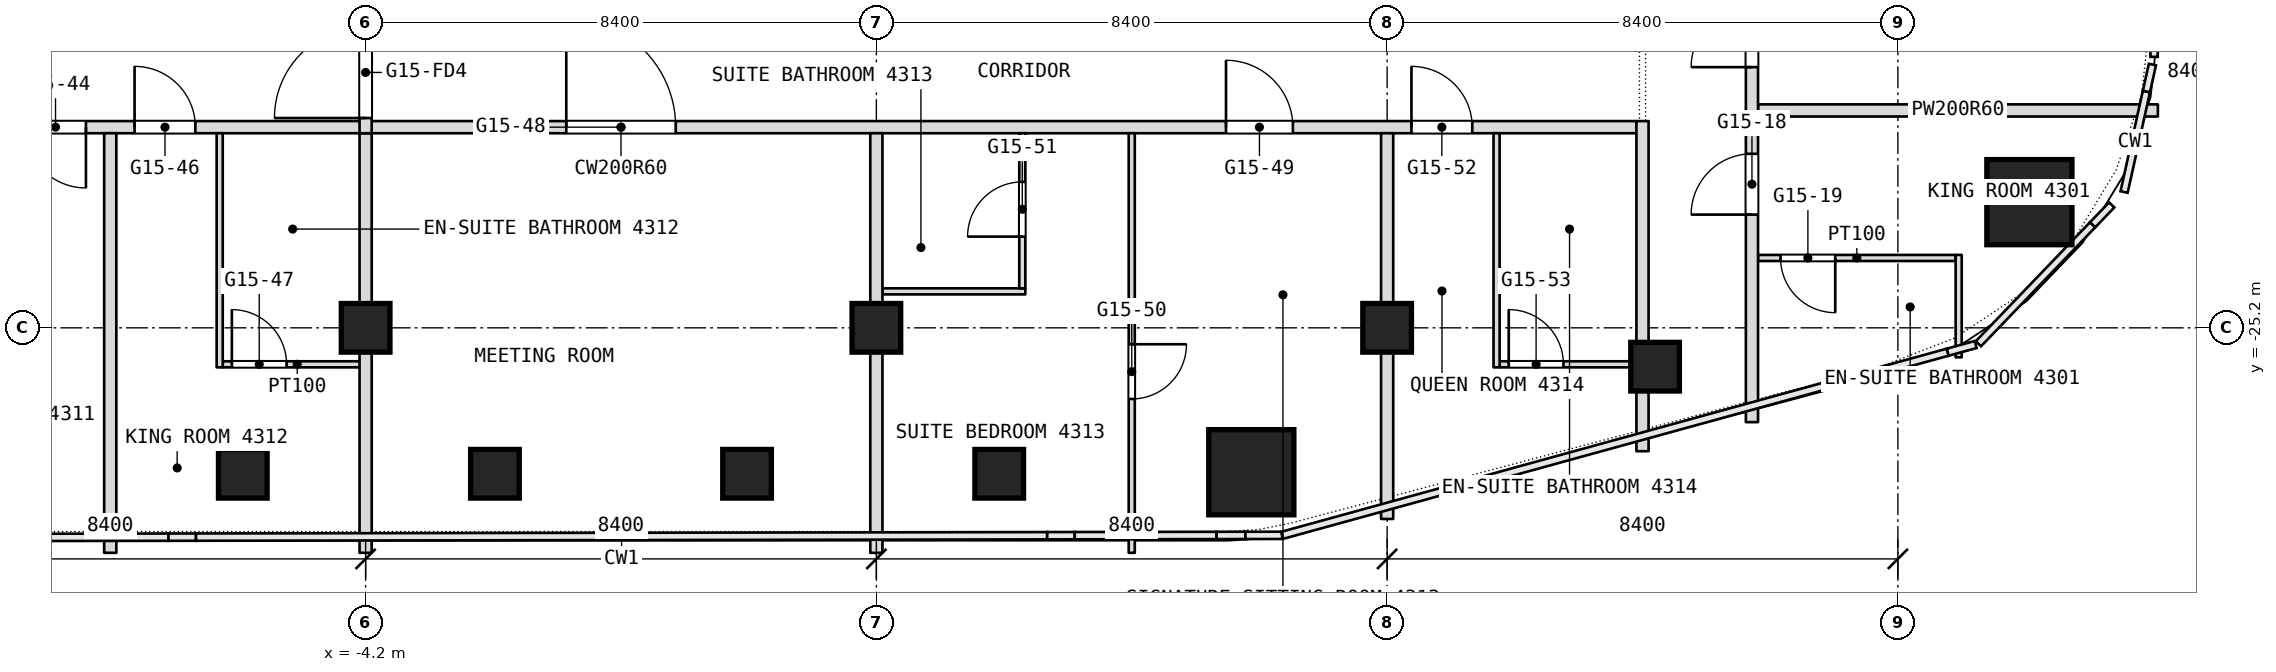
"""IFC4 building model, lengths in metres.
Left out: names, types, materials, properties, quantities, classifications, styles, units other than length and angle.
Written with IfcOpenShell. Run it as: python <this file> out.ifc"""

import sys

from ifc_helpers import new_model, si_unit, direction, frame, frame_2d, origin, origin_2d, place, context, subcontext, project, spatial, rectangle, extrude, element, fill, save


model = new_model("IFC4")
c1 = context("Model", 3, precision=1e-05, world=origin(), true_north=direction((0.0, 1.0)))
c2 = subcontext(c1, "Body", "Model", "MODEL_VIEW")
j1 = project(units=[si_unit("LENGTHUNIT", "METRE"), si_unit("PLANEANGLEUNIT", "RADIAN")], contexts=[c1])
p1 = place(None, origin())
s1 = spatial("IfcSite", under=j1, at=p1, CompositionType="ELEMENT")
p2 = place(p1, origin())
s2 = spatial("IfcBuilding", under=s1, at=p2, CompositionType="ELEMENT")
p3 = place(p2, frame((0.0, 0.0, 191.3)))
s3 = spatial("IfcBuildingStorey", under=s2, at=p3, CompositionType="ELEMENT", Elevation=191.3)
for number, where, z_axis, x_axis in (
    (1, (10.366, -27.575, 0.0), (0.0, 0.0, 1.0), (1.0, 0.0, 0.0)),
    (2, (23.163, -23.133, 0.0), (0.0, 0.0, 1.0), (1.0, 0.0, 0.0)),
):
    element("IfcColumn", number, at=place(p3, frame(where, z_axis=z_axis, x_axis=x_axis)), inside=s3, PredefinedType="COLUMN", context=c2, shape_type="SweptSolid", body=[
        extrude(rectangle(XDim=1.4, YDim=1.4, at=origin_2d()), origin(), (0.0, 0.0, 1.0), 3.6),
    ])
for number, where, z_axis, x_axis in (
    (3, (-4.2, -25.2, 0.0), (0.0, 0.0, 1.0), (1.0, 0.0, 0.0)),
    (4, (4.2, -25.2, 0.0), (0.0, 0.0, 1.0), (1.0, 0.0, 0.0)),
    (5, (12.6, -25.2, 0.0), (0.0, 0.0, 1.0), (1.0, 0.0, 0.0)),
    (6, (17.007, -25.839, 0.0), (0.0, 0.0, 1.0), (1.0, 0.0, 0.0)),
    (7, (6.22, -27.6, 0.0), (0.0, 0.0, 1.0), (1.0, 0.0, 0.0)),
    (8, (2.073, -27.6, 0.0), (0.0, 0.0, 1.0), (1.0, 0.0, 0.0)),
    (9, (-2.073, -27.6, 0.0), (0.0, 0.0, 1.0), (1.0, 0.0, 0.0)),
    (10, (-6.22, -27.6, 0.0), (0.0, 0.0, 1.0), (1.0, 0.0, 0.0)),
):
    element("IfcColumn", number, at=place(p3, frame(where, z_axis=z_axis, x_axis=x_axis)), inside=s3, PredefinedType="COLUMN", context=c2, shape_type="SweptSolid", body=[
        extrude(rectangle(XDim=0.8, YDim=0.8, at=origin_2d()), origin(), (0.0, 0.0, 1.0), 3.6),
    ])
p4 = place(p3, frame((-6.55, -25.8, 0.0), z_axis=(0.0, 0.0, 1.0), x_axis=(1.0, 0.0, 0.0)))
e11 = element("IfcWall", 11, at=p4, inside=s3, PredefinedType="PARTITIONING", context=c2, shape_type="SweptSolid", body=[
    extrude(rectangle(XDim=2.45, YDim=0.1, at=frame_2d((1.225, 0.0))), origin(), (0.0, 0.0, 1.0), 3.34),
])
p5 = place(p4, frame((0.15, 0.0, 0.0)))
e12 = element("IfcOpeningElement", 12, at=p5, cuts=e11, PredefinedType="OPENING", context=c2, shape_type="SweptSolid", body=[
    extrude(rectangle(XDim=0.9, YDim=2.1, at=frame_2d((0.45, 1.05))), frame((0.0, 0.05, 0.0), z_axis=(0.0, -1.0, 0.0), x_axis=(1.0, 0.0, 0.0)), (0.0, 0.0, 1.0), 0.1),
])
p6 = place(p3, frame((14.45, -25.8, 0.0), z_axis=(0.0, 0.0, 1.0), x_axis=(1.0, 0.0, 0.0)))
e13 = element("IfcWall", 13, at=p6, inside=s3, PredefinedType="PARTITIONING", context=c2, shape_type="SweptSolid", body=[
    extrude(rectangle(XDim=2.25, YDim=0.1, at=frame_2d((1.125, 0.0))), origin(), (0.0, 0.0, 1.0), 3.34),
])
p7 = place(p6, frame((0.15, 0.0, 0.0)))
e14 = element("IfcOpeningElement", 14, at=p7, cuts=e13, PredefinedType="OPENING", context=c2, shape_type="SweptSolid", body=[
    extrude(rectangle(XDim=0.9, YDim=2.1, at=frame_2d((0.45, 1.05))), frame((0.0, 0.05, 0.0), z_axis=(0.0, -1.0, 0.0), x_axis=(1.0, 0.0, 0.0)), (0.0, 0.0, 1.0), 0.1),
])
p8 = place(p3, frame((4.3, -24.6, 0.0), z_axis=(0.0, 0.0, 1.0), x_axis=(1.0, 0.0, 0.0)))
e15 = element("IfcWall", 15, at=p8, inside=s3, PredefinedType="PARTITIONING", context=c2, shape_type="SweptSolid", body=[
    extrude(rectangle(XDim=2.35, YDim=0.1, at=frame_2d((1.175, 0.0))), origin(), (0.0, 0.0, 1.0), 3.34),
])
p9 = place(p3, frame((18.7, -24.051, 0.0), z_axis=(0.0, 0.0, 1.0), x_axis=(1.0, 0.0, 0.0)))
e16 = element("IfcWall", 16, at=p9, inside=s3, PredefinedType="PARTITIONING", context=c2, shape_type="SweptSolid", body=[
    extrude(rectangle(XDim=3.25, YDim=0.1, at=frame_2d((1.625, 0.0))), origin(), (0.0, 0.0, 1.0), 3.34),
])
p10 = place(p9, frame((0.37, 0.0, 0.0)))
e17 = element("IfcOpeningElement", 17, at=p10, cuts=e16, PredefinedType="OPENING", context=c2, shape_type="SweptSolid", body=[
    extrude(rectangle(XDim=0.9, YDim=2.1, at=frame_2d((0.45, 1.05))), frame((0.0, 0.05, 0.0), z_axis=(0.0, -1.0, 0.0), x_axis=(1.0, 0.0, 0.0)), (0.0, 0.0, 1.0), 0.1),
])
p11 = place(p3, frame((22.0, -25.685, 0.0), z_axis=(0.0, 0.0, 1.0), x_axis=(0.0, 1.0, 0.0)))
e18 = element("IfcWall", 18, at=p11, inside=s3, PredefinedType="PARTITIONING", context=c2, shape_type="SweptSolid", body=[
    extrude(rectangle(XDim=1.684, YDim=0.1, at=frame_2d((0.842, 0.0))), origin(), (0.0, 0.0, 1.0), 3.34),
])
p12 = place(p3, frame((-16.7, -21.9, 0.0), z_axis=(0.0, 0.0, 1.0), x_axis=(1.0, 0.0, 0.0)))
e19 = element("IfcWall", 19, at=p12, inside=s3, PredefinedType="PARTITIONING", context=c2, shape_type="SweptSolid", body=[
    extrude(rectangle(XDim=33.4, YDim=0.2, at=frame_2d((16.7, 0.0))), origin(), (0.0, 0.0, 1.0), 3.34),
])
p13 = place(p12, frame((0.3, 0.0, 0.0)))
e20 = element("IfcOpeningElement", 20, at=p13, cuts=e19, PredefinedType="OPENING", context=c2, shape_type="SweptSolid", body=[
    extrude(rectangle(XDim=1.0, YDim=2.1, at=frame_2d((0.5, 1.05))), frame((0.0, 0.1, 0.0), z_axis=(0.0, -1.0, 0.0), x_axis=(1.0, 0.0, 0.0)), (0.0, 0.0, 1.0), 0.2),
])
p14 = place(p12, frame((6.9, 0.0, 0.0)))
e21 = element("IfcOpeningElement", 21, at=p14, cuts=e19, PredefinedType="OPENING", context=c2, shape_type="SweptSolid", body=[
    extrude(rectangle(XDim=1.0, YDim=2.1, at=frame_2d((0.5, 1.05))), frame((0.0, 0.1, 0.0), z_axis=(0.0, -1.0, 0.0), x_axis=(1.0, 0.0, 0.0)), (0.0, 0.0, 1.0), 0.2),
])
p15 = place(p12, frame((8.7, 0.0, 0.0)))
e22 = element("IfcOpeningElement", 22, at=p15, cuts=e19, PredefinedType="OPENING", context=c2, shape_type="SweptSolid", body=[
    extrude(rectangle(XDim=1.0, YDim=2.1, at=frame_2d((0.5, 1.05))), frame((0.0, 0.1, 0.0), z_axis=(0.0, -1.0, 0.0), x_axis=(1.0, 0.0, 0.0)), (0.0, 0.0, 1.0), 0.2),
])
p16 = place(p12, frame((15.8, 0.0, 0.0)))
e23 = element("IfcOpeningElement", 23, at=p16, cuts=e19, PredefinedType="OPENING", context=c2, shape_type="SweptSolid", body=[
    extrude(rectangle(XDim=1.8, YDim=2.1, at=frame_2d((0.9, 1.05))), frame((0.0, 0.1, 0.0), z_axis=(0.0, -1.0, 0.0), x_axis=(1.0, 0.0, 0.0)), (0.0, 0.0, 1.0), 0.2),
])
p17 = place(p12, frame((26.65, 0.0, 0.0)))
e24 = element("IfcOpeningElement", 24, at=p17, cuts=e19, PredefinedType="OPENING", context=c2, shape_type="SweptSolid", body=[
    extrude(rectangle(XDim=1.1, YDim=2.1, at=frame_2d((0.55, 1.05))), frame((0.0, 0.1, 0.0), z_axis=(0.0, -1.0, 0.0), x_axis=(1.0, 0.0, 0.0)), (0.0, 0.0, 1.0), 0.2),
])
p18 = place(p12, frame((29.7, 0.0, 0.0)))
e25 = element("IfcOpeningElement", 25, at=p18, cuts=e19, PredefinedType="OPENING", context=c2, shape_type="SweptSolid", body=[
    extrude(rectangle(XDim=1.0, YDim=2.1, at=frame_2d((0.5, 1.05))), frame((0.0, 0.1, 0.0), z_axis=(0.0, -1.0, 0.0), x_axis=(1.0, 0.0, 0.0)), (0.0, 0.0, 1.0), 0.2),
])
p19 = place(p3, frame((18.7, -21.625, 0.0), z_axis=(0.0, 0.0, 1.0), x_axis=(1.0, 0.0, 0.0)))
e26 = element("IfcWall", 26, at=p19, inside=s3, PredefinedType="PARTITIONING", context=c2, shape_type="SweptSolid", body=[
    extrude(rectangle(XDim=6.576, YDim=0.2, at=frame_2d((3.288, 0.0))), origin(), (0.0, 0.0, 1.0), 3.34),
])
p20 = place(p3, frame((18.6, -26.751, 0.0), z_axis=(0.0, 0.0, 1.0), x_axis=(0.0, 1.0, 0.0)))
e27 = element("IfcWall", 27, at=p20, inside=s3, PredefinedType="PARTITIONING", context=c2, shape_type="SweptSolid", body=[
    extrude(rectangle(XDim=49.091, YDim=0.2, at=frame_2d((24.545, 0.0))), origin(), (0.0, 0.0, 1.0), 3.34),
])
p21 = place(p20, frame((3.413, 0.0, 0.0)))
e28 = element("IfcOpeningElement", 28, at=p21, cuts=e27, PredefinedType="OPENING", context=c2, shape_type="SweptSolid", body=[
    extrude(rectangle(XDim=1.0, YDim=2.1, at=frame_2d((0.5, 1.05))), frame((0.0, 0.1, 0.0), z_axis=(0.0, -1.0, 0.0), x_axis=(1.0, 0.0, 0.0)), (0.0, 0.0, 1.0), 0.2),
])
p22 = place(p20, frame((5.838, 0.0, 0.0)))
e29 = element("IfcOpeningElement", 29, at=p22, cuts=e27, PredefinedType="OPENING", context=c2, shape_type="SweptSolid", body=[
    extrude(rectangle(XDim=1.0, YDim=2.1, at=frame_2d((0.5, 1.05))), frame((0.0, 0.1, 0.0), z_axis=(0.0, -1.0, 0.0), x_axis=(1.0, 0.0, 0.0)), (0.0, 0.0, 1.0), 0.2),
])
p23 = place(p20, frame((10.351, 0.0, 0.0)))
e30 = element("IfcOpeningElement", 30, at=p23, cuts=e27, PredefinedType="OPENING", context=c2, shape_type="SweptSolid", body=[
    extrude(rectangle(XDim=1.0, YDim=2.1, at=frame_2d((0.5, 1.05))), frame((0.0, 0.1, 0.0), z_axis=(0.0, -1.0, 0.0), x_axis=(1.0, 0.0, 0.0)), (0.0, 0.0, 1.0), 0.2),
])
p24 = place(p20, frame((16.951, 0.0, 0.0)))
e31 = element("IfcOpeningElement", 31, at=p24, cuts=e27, PredefinedType="OPENING", context=c2, shape_type="SweptSolid", body=[
    extrude(rectangle(XDim=1.0, YDim=2.1, at=frame_2d((0.5, 1.05))), frame((0.0, 0.1, 0.0), z_axis=(0.0, -1.0, 0.0), x_axis=(1.0, 0.0, 0.0)), (0.0, 0.0, 1.0), 0.2),
])
p25 = place(p20, frame((21.151, 0.0, 0.0)))
e32 = element("IfcOpeningElement", 32, at=p25, cuts=e27, PredefinedType="OPENING", context=c2, shape_type="SweptSolid", body=[
    extrude(rectangle(XDim=1.0, YDim=2.1, at=frame_2d((0.5, 1.05))), frame((0.0, 0.1, 0.0), z_axis=(0.0, -1.0, 0.0), x_axis=(1.0, 0.0, 0.0)), (0.0, 0.0, 1.0), 0.2),
])
p26 = place(p20, frame((22.951, 0.0, 0.0)))
e33 = element("IfcOpeningElement", 33, at=p26, cuts=e27, PredefinedType="OPENING", context=c2, shape_type="SweptSolid", body=[
    extrude(rectangle(XDim=1.0, YDim=2.1, at=frame_2d((0.5, 1.05))), frame((0.0, 0.1, 0.0), z_axis=(0.0, -1.0, 0.0), x_axis=(1.0, 0.0, 0.0)), (0.0, 0.0, 1.0), 0.2),
])
p27 = place(p20, frame((27.151, 0.0, 0.0)))
e34 = element("IfcOpeningElement", 34, at=p27, cuts=e27, PredefinedType="OPENING", context=c2, shape_type="SweptSolid", body=[
    extrude(rectangle(XDim=1.0, YDim=2.1, at=frame_2d((0.5, 1.05))), frame((0.0, 0.1, 0.0), z_axis=(0.0, -1.0, 0.0), x_axis=(1.0, 0.0, 0.0)), (0.0, 0.0, 1.0), 0.2),
])
p28 = place(p20, frame((33.751, 0.0, 0.0)))
e35 = element("IfcOpeningElement", 35, at=p28, cuts=e27, PredefinedType="OPENING", context=c2, shape_type="SweptSolid", body=[
    extrude(rectangle(XDim=1.0, YDim=2.1, at=frame_2d((0.5, 1.05))), frame((0.0, 0.1, 0.0), z_axis=(0.0, -1.0, 0.0), x_axis=(1.0, 0.0, 0.0)), (0.0, 0.0, 1.0), 0.2),
])
p29 = place(p20, frame((38.451, 0.0, 0.0)))
e36 = element("IfcOpeningElement", 36, at=p29, cuts=e27, PredefinedType="OPENING", context=c2, shape_type="SweptSolid", body=[
    extrude(rectangle(XDim=1.8, YDim=2.1, at=frame_2d((0.9, 1.05))), frame((0.0, 0.1, 0.0), z_axis=(0.0, -1.0, 0.0), x_axis=(1.0, 0.0, 0.0)), (0.0, 0.0, 1.0), 0.2),
])
p30 = place(p20, frame((44.051, 0.0, 0.0)))
e37 = element("IfcOpeningElement", 37, at=p30, cuts=e27, PredefinedType="OPENING", context=c2, shape_type="SweptSolid", body=[
    extrude(rectangle(XDim=1.0, YDim=2.1, at=frame_2d((0.5, 1.05))), frame((0.0, 0.1, 0.0), z_axis=(0.0, -1.0, 0.0), x_axis=(1.0, 0.0, 0.0)), (0.0, 0.0, 1.0), 0.2),
])
p31 = place(p3, frame((16.8, -27.229, 0.0), z_axis=(0.0, 0.0, 1.0), x_axis=(0.0, 1.0, 0.0)))
e38 = element("IfcWall", 38, at=p31, inside=s3, PredefinedType="PARTITIONING", context=c2, shape_type="SweptSolid", body=[
    extrude(rectangle(XDim=5.429, YDim=0.2, at=frame_2d((2.714, 0.0))), origin(), (0.0, 0.0, 1.0), 3.34),
])
p32 = place(p3, frame((14.4, -25.85, 0.0), z_axis=(0.0, 0.0, 1.0), x_axis=(0.0, 1.0, 0.0)))
e39 = element("IfcWall", 39, at=p32, inside=s3, PredefinedType="PARTITIONING", context=c2, shape_type="SweptSolid", body=[
    extrude(rectangle(XDim=3.85, YDim=0.1, at=frame_2d((1.925, 0.0))), origin(), (0.0, 0.0, 1.0), 3.34),
])
p33 = place(p3, frame((12.6, -28.343, 0.0), z_axis=(0.0, 0.0, 1.0), x_axis=(0.0, 1.0, 0.0)))
e40 = element("IfcWall", 40, at=p33, inside=s3, PredefinedType="PARTITIONING", context=c2, shape_type="SweptSolid", body=[
    extrude(rectangle(XDim=6.343, YDim=0.2, at=frame_2d((3.171, 0.0))), origin(), (0.0, 0.0, 1.0), 3.34),
])
p34 = place(p3, frame((8.4, -28.9, 0.0), z_axis=(0.0, 0.0, 1.0), x_axis=(0.0, 1.0, 0.0)))
e41 = element("IfcWall", 41, at=p34, inside=s3, PredefinedType="PARTITIONING", context=c2, shape_type="SweptSolid", body=[
    extrude(rectangle(XDim=6.9, YDim=0.1, at=frame_2d((3.45, 0.0))), origin(), (0.0, 0.0, 1.0), 3.34),
])
p35 = place(p34, frame((2.53, 0.0, 0.0)))
e42 = element("IfcOpeningElement", 42, at=p35, cuts=e41, PredefinedType="OPENING", context=c2, shape_type="SweptSolid", body=[
    extrude(rectangle(XDim=0.9, YDim=2.1, at=frame_2d((0.45, 1.05))), frame((0.0, 0.05, 0.0), z_axis=(0.0, -1.0, 0.0), x_axis=(1.0, 0.0, 0.0)), (0.0, 0.0, 1.0), 0.1),
])
p36 = place(p3, frame((6.6, -24.55, 0.0), z_axis=(0.0, 0.0, 1.0), x_axis=(0.0, 1.0, 0.0)))
e43 = element("IfcWall", 43, at=p36, inside=s3, PredefinedType="PARTITIONING", context=c2, shape_type="SweptSolid", body=[
    extrude(rectangle(XDim=2.55, YDim=0.1, at=frame_2d((1.275, 0.0))), origin(), (0.0, 0.0, 1.0), 3.34),
])
p37 = place(p36, frame((0.85, 0.0, 0.0)))
e44 = element("IfcOpeningElement", 44, at=p37, cuts=e43, PredefinedType="OPENING", context=c2, shape_type="SweptSolid", body=[
    extrude(rectangle(XDim=0.9, YDim=2.1, at=frame_2d((0.45, 1.05))), frame((0.0, 0.05, 0.0), z_axis=(0.0, -1.0, 0.0), x_axis=(1.0, 0.0, 0.0)), (0.0, 0.0, 1.0), 0.1),
])
for number, where, z_axis, x_axis in (
    (45, (4.2, -28.9, 0.0), (0.0, 0.0, 1.0), (0.0, 1.0, 0.0)),
    (46, (-4.2, -28.9, 0.0), (0.0, 0.0, 1.0), (0.0, 1.0, 0.0)),
):
    element("IfcWall", number, at=place(p3, frame(where, z_axis=z_axis, x_axis=x_axis)), inside=s3, PredefinedType="PARTITIONING", context=c2, shape_type="SweptSolid", body=[
        extrude(rectangle(XDim=6.9, YDim=0.2, at=frame_2d((3.45, 0.0))), origin(), (0.0, 0.0, 1.0), 3.34),
    ])
p38 = place(p3, frame((-4.2, -22.0, 0.0), z_axis=(0.0, 0.0, 1.0), x_axis=(0.0, 1.0, 0.0)))
e47 = element("IfcWall", 47, at=p38, inside=s3, PredefinedType="PARTITIONING", context=c2, shape_type="SweptSolid", body=[
    extrude(rectangle(XDim=8.4, YDim=0.2, at=frame_2d((4.2, 0.0))), origin(), (0.0, 0.0, 1.0), 3.34),
])
p39 = place(p38, frame((0.25, 0.0, 0.0)))
e48 = element("IfcOpeningElement", 48, at=p39, cuts=e47, PredefinedType="OPENING", context=c2, shape_type="SweptSolid", body=[
    extrude(rectangle(XDim=1.5, YDim=2.1, at=frame_2d((0.75, 1.05))), frame((0.0, 0.1, 0.0), z_axis=(0.0, -1.0, 0.0), x_axis=(1.0, 0.0, 0.0)), (0.0, 0.0, 1.0), 0.2),
])
p40 = place(p3, frame((-6.6, -25.85, 0.0), z_axis=(0.0, 0.0, 1.0), x_axis=(0.0, 1.0, 0.0)))
e49 = element("IfcWall", 49, at=p40, inside=s3, PredefinedType="PARTITIONING", context=c2, shape_type="SweptSolid", body=[
    extrude(rectangle(XDim=3.85, YDim=0.1, at=frame_2d((1.925, 0.0))), origin(), (0.0, 0.0, 1.0), 3.34),
])
p41 = place(p3, frame((-8.4, -28.9, 0.0), z_axis=(0.0, 0.0, 1.0), x_axis=(0.0, 1.0, 0.0)))
e50 = element("IfcWall", 50, at=p41, inside=s3, PredefinedType="PARTITIONING", context=c2, shape_type="SweptSolid", body=[
    extrude(rectangle(XDim=6.9, YDim=0.2, at=frame_2d((3.45, 0.0))), origin(), (0.0, 0.0, 1.0), 3.34),
])
p42 = place(p5, origin())
e51 = element("IfcDoor", 51, at=p42, inside=s3, OperationType="SINGLE_SWING_LEFT", PredefinedType="DOOR", context=c2, shape_type="SweptSolid", body=[
    extrude(rectangle(XDim=0.9, YDim=2.1, at=frame_2d((0.45, 1.05))), frame((0.0, 0.025, 0.0), z_axis=(0.0, -1.0, 0.0), x_axis=(1.0, 0.0, 0.0)), (0.0, 0.0, 1.0), 0.05),
])
fill(e12, e51)
p43 = place(p7, origin())
e52 = element("IfcDoor", 52, at=p43, inside=s3, OperationType="SINGLE_SWING_LEFT", PredefinedType="DOOR", context=c2, shape_type="SweptSolid", body=[
    extrude(rectangle(XDim=0.9, YDim=2.1, at=frame_2d((0.45, 1.05))), frame((0.0, 0.025, 0.0), z_axis=(0.0, -1.0, 0.0), x_axis=(1.0, 0.0, 0.0)), (0.0, 0.0, 1.0), 0.05),
])
fill(e14, e52)
p44 = place(p10, origin())
e53 = element("IfcDoor", 53, at=p44, inside=s3, OperationType="SINGLE_SWING_RIGHT", PredefinedType="DOOR", context=c2, shape_type="SweptSolid", body=[
    extrude(rectangle(XDim=0.9, YDim=2.1, at=frame_2d((0.45, 1.05))), frame((0.0, 0.025, 0.0), z_axis=(0.0, -1.0, 0.0), x_axis=(1.0, 0.0, 0.0)), (0.0, 0.0, 1.0), 0.05),
])
fill(e17, e53)
p45 = place(p14, origin())
e54 = element("IfcDoor", 54, at=p45, inside=s3, OperationType="SINGLE_SWING_RIGHT", PredefinedType="DOOR", context=c2, shape_type="SweptSolid", body=[
    extrude(rectangle(XDim=1.0, YDim=2.1, at=frame_2d((0.5, 1.05))), frame((0.0, 0.025, 0.0), z_axis=(0.0, -1.0, 0.0), x_axis=(1.0, 0.0, 0.0)), (0.0, 0.0, 1.0), 0.05),
])
fill(e21, e54)
p46 = place(p15, origin())
e55 = element("IfcDoor", 55, at=p46, inside=s3, OperationType="SINGLE_SWING_RIGHT", PredefinedType="DOOR", context=c2, shape_type="SweptSolid", body=[
    extrude(rectangle(XDim=1.0, YDim=2.1, at=frame_2d((0.5, 1.05))), frame((0.0, 0.025, 0.0), z_axis=(0.0, -1.0, 0.0), x_axis=(1.0, 0.0, 0.0)), (0.0, 0.0, 1.0), 0.05),
])
fill(e22, e55)
p47 = place(p16, origin())
e56 = element("IfcDoor", 56, at=p47, inside=s3, OperationType="DOUBLE_DOOR_SINGLE_SWING", PredefinedType="DOOR", context=c2, shape_type="SweptSolid", body=[
    extrude(rectangle(XDim=1.8, YDim=2.1, at=frame_2d((0.9, 1.05))), frame((0.0, 0.025, 0.0), z_axis=(0.0, -1.0, 0.0), x_axis=(1.0, 0.0, 0.0)), (0.0, 0.0, 1.0), 0.05),
])
fill(e23, e56)
p48 = place(p17, origin())
e57 = element("IfcDoor", 57, at=p48, inside=s3, OperationType="SINGLE_SWING_LEFT", PredefinedType="DOOR", context=c2, shape_type="SweptSolid", body=[
    extrude(rectangle(XDim=1.1, YDim=2.1, at=frame_2d((0.55, 1.05))), frame((0.0, 0.025, 0.0), z_axis=(0.0, -1.0, 0.0), x_axis=(1.0, 0.0, 0.0)), (0.0, 0.0, 1.0), 0.05),
])
fill(e24, e57)
p49 = place(p18, origin())
e58 = element("IfcDoor", 58, at=p49, inside=s3, OperationType="SINGLE_SWING_RIGHT", PredefinedType="DOOR", context=c2, shape_type="SweptSolid", body=[
    extrude(rectangle(XDim=1.0, YDim=2.1, at=frame_2d((0.5, 1.05))), frame((0.0, 0.025, 0.0), z_axis=(0.0, -1.0, 0.0), x_axis=(1.0, 0.0, 0.0)), (0.0, 0.0, 1.0), 0.05),
])
fill(e25, e58)
p50 = place(p21, origin())
e59 = element("IfcDoor", 59, at=p50, inside=s3, OperationType="SINGLE_SWING_RIGHT", PredefinedType="DOOR", context=c2, shape_type="SweptSolid", body=[
    extrude(rectangle(XDim=1.0, YDim=2.1, at=frame_2d((0.5, 1.05))), frame((0.0, 0.025, 0.0), z_axis=(0.0, -1.0, 0.0), x_axis=(1.0, 0.0, 0.0)), (0.0, 0.0, 1.0), 0.05),
])
fill(e28, e59)
p51 = place(p22, origin())
e60 = element("IfcDoor", 60, at=p51, inside=s3, OperationType="SINGLE_SWING_RIGHT", PredefinedType="DOOR", context=c2, shape_type="SweptSolid", body=[
    extrude(rectangle(XDim=1.0, YDim=2.1, at=frame_2d((0.5, 1.05))), frame((0.0, 0.025, 0.0), z_axis=(0.0, -1.0, 0.0), x_axis=(1.0, 0.0, 0.0)), (0.0, 0.0, 1.0), 0.05),
])
fill(e29, e60)
p52 = place(p35, origin())
e61 = element("IfcDoor", 61, at=p52, inside=s3, OperationType="SINGLE_SWING_LEFT", PredefinedType="DOOR", context=c2, shape_type="SweptSolid", body=[
    extrude(rectangle(XDim=0.9, YDim=2.1, at=frame_2d((0.45, 1.05))), frame((0.0, 0.025, 0.0), z_axis=(0.0, -1.0, 0.0), x_axis=(1.0, 0.0, 0.0)), (0.0, 0.0, 1.0), 0.05),
])
fill(e42, e61)
p53 = place(p37, origin())
e62 = element("IfcDoor", 62, at=p53, inside=s3, OperationType="SINGLE_SWING_RIGHT", PredefinedType="DOOR", context=c2, shape_type="SweptSolid", body=[
    extrude(rectangle(XDim=0.9, YDim=2.1, at=frame_2d((0.45, 1.05))), frame((0.0, 0.025, 0.0), z_axis=(0.0, -1.0, 0.0), x_axis=(1.0, 0.0, 0.0)), (0.0, 0.0, 1.0), 0.05),
])
fill(e44, e62)
p54 = place(p39, origin())
e63 = element("IfcDoor", 63, at=p54, inside=s3, OperationType="DOUBLE_DOOR_DOUBLE_SWING", PredefinedType="DOOR", context=c2, shape_type="SweptSolid", body=[
    extrude(rectangle(XDim=1.5, YDim=2.1, at=frame_2d((0.75, 1.05))), frame((0.0, 0.025, 0.0), z_axis=(0.0, -1.0, 0.0), x_axis=(1.0, 0.0, 0.0)), (0.0, 0.0, 1.0), 0.05),
])
fill(e48, e63)
save(model, sys.argv[1])
